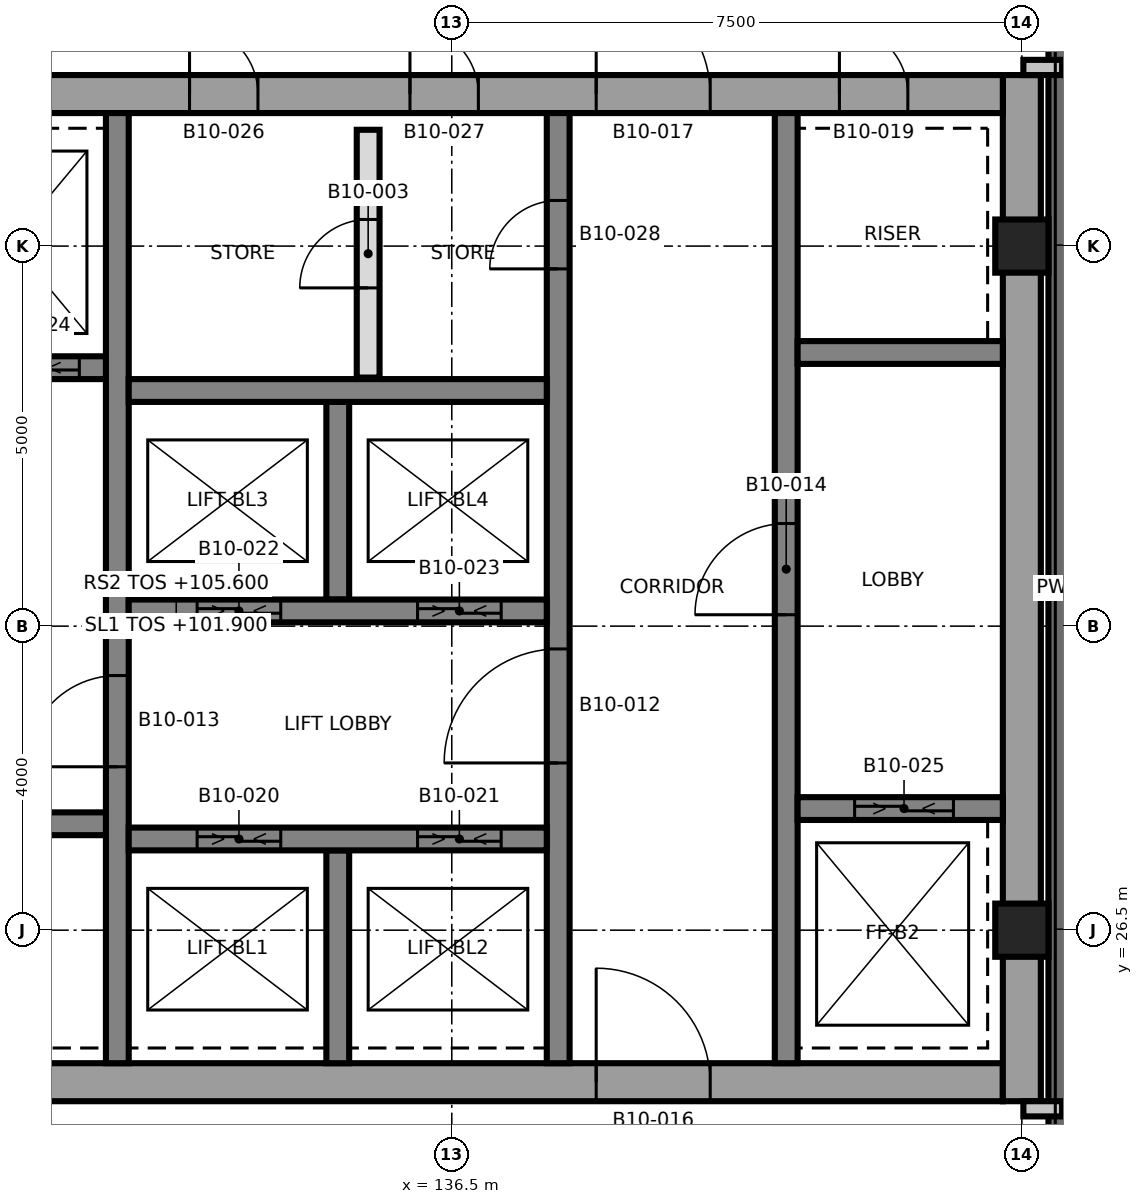
"""IFC4 building model, lengths in metres.
Left out: names, types, materials, properties, quantities, classifications, styles, units other than length and angle.
Written with IfcOpenShell. Run it as: python <this file> out.ifc"""

import sys

from ifc_helpers import new_model, si_unit, direction, frame, frame_2d, origin, origin_2d, place, context, subcontext, project, spatial, rectangle, extrude, element, fill, save


model = new_model("IFC4")
c1 = context("Model", 3, precision=1e-05, world=origin(), true_north=direction((0.0, 1.0)))
c2 = subcontext(c1, "Body", "Model", "MODEL_VIEW")
j1 = project(units=[si_unit("LENGTHUNIT", "METRE"), si_unit("PLANEANGLEUNIT", "RADIAN")], contexts=[c1])
p1 = place(None, origin())
s1 = spatial("IfcSite", under=j1, at=p1, CompositionType="ELEMENT")
p2 = place(p1, origin())
s2 = spatial("IfcBuilding", under=s1, at=p2, CompositionType="ELEMENT")
p3 = place(p2, frame((0.0, 0.0, 101.9)))
s3 = spatial("IfcBuildingStorey", under=s2, at=p3, CompositionType="ELEMENT", Elevation=101.9)
p4 = place(p3, frame((128.75, 24.5, 0.0), z_axis=(0.0, 0.0, 1.0), x_axis=(1.0, 0.0, 0.0)))
e1 = element("IfcWall", 1, at=p4, inside=s3, PredefinedType="SHEAR", context=c2, shape_type="SweptSolid", body=[
    extrude(rectangle(XDim=15.0, YDim=0.5, at=frame_2d((7.5, 0.0))), origin(), (0.0, 0.0, 1.0), 3.7),
])
p5 = place(p4, frame((9.65, 0.0, 0.0)))
e2 = element("IfcOpeningElement", 2, at=p5, cuts=e1, PredefinedType="OPENING", context=c2, shape_type="SweptSolid", body=[
    extrude(rectangle(XDim=1.5, YDim=2.1, at=frame_2d((0.75, 1.05))), frame((0.0, 0.26, 0.0), z_axis=(0.0, -1.0, 0.0), x_axis=(1.0, 0.0, 0.0)), (0.0, 0.0, 1.0), 0.52),
])
p6 = place(p4, frame((1.25, 0.0, 0.0)))
e3 = element("IfcOpeningElement", 3, at=p6, cuts=e1, PredefinedType="OPENING", context=c2, shape_type="SweptSolid", body=[
    extrude(rectangle(XDim=0.9, YDim=2.1, at=frame_2d((0.45, 1.05))), frame((0.0, 0.26, 0.0), z_axis=(0.0, -1.0, 0.0), x_axis=(1.0, 0.0, 0.0)), (0.0, 0.0, 1.0), 0.52),
])
p7 = place(p3, frame((144.0, 24.25, 0.0), z_axis=(0.0, 0.0, 1.0), x_axis=(0.0, 1.0, 0.0)))
e4 = element("IfcWall", 4, at=p7, inside=s3, PredefinedType="SHEAR", context=c2, shape_type="SweptSolid", body=[
    extrude(rectangle(XDim=13.5, YDim=0.5, at=frame_2d((6.75, 0.0))), origin(), (0.0, 0.0, 1.0), 3.7),
])
p8 = place(p3, frame((128.75, 37.5, 0.0), z_axis=(0.0, 0.0, 1.0), x_axis=(1.0, 0.0, 0.0)))
e5 = element("IfcWall", 5, at=p8, inside=s3, PredefinedType="SHEAR", context=c2, shape_type="SweptSolid", body=[
    extrude(rectangle(XDim=15.0, YDim=0.5, at=frame_2d((7.5, 0.0))), origin(), (0.0, 0.0, 1.0), 3.7),
])
p9 = place(p8, frame((9.65, 0.0, 0.0)))
e6 = element("IfcOpeningElement", 6, at=p9, cuts=e5, PredefinedType="OPENING", context=c2, shape_type="SweptSolid", body=[
    extrude(rectangle(XDim=1.5, YDim=2.1, at=frame_2d((0.75, 1.05))), frame((0.0, 0.26, 0.0), z_axis=(0.0, -1.0, 0.0), x_axis=(1.0, 0.0, 0.0)), (0.0, 0.0, 1.0), 0.52),
])
p10 = place(p8, frame((12.85, 0.0, 0.0)))
e7 = element("IfcOpeningElement", 7, at=p10, cuts=e5, PredefinedType="OPENING", context=c2, shape_type="SweptSolid", body=[
    extrude(rectangle(XDim=0.9, YDim=2.1, at=frame_2d((0.45, 1.05))), frame((0.0, 0.26, 0.0), z_axis=(0.0, -1.0, 0.0), x_axis=(1.0, 0.0, 0.0)), (0.0, 0.0, 1.0), 0.52),
])
p11 = place(p8, frame((4.3, 0.0, 0.0)))
e8 = element("IfcOpeningElement", 8, at=p11, cuts=e5, PredefinedType="OPENING", context=c2, shape_type="SweptSolid", body=[
    extrude(rectangle(XDim=0.9, YDim=2.1, at=frame_2d((0.45, 1.05))), frame((0.0, 0.26, 0.0), z_axis=(0.0, -1.0, 0.0), x_axis=(1.0, 0.0, 0.0)), (0.0, 0.0, 1.0), 0.52),
])
p12 = place(p8, frame((7.2, 0.0, 0.0)))
e9 = element("IfcOpeningElement", 9, at=p12, cuts=e5, PredefinedType="OPENING", context=c2, shape_type="SweptSolid", body=[
    extrude(rectangle(XDim=0.9, YDim=2.1, at=frame_2d((0.45, 1.05))), frame((0.0, 0.26, 0.0), z_axis=(0.0, -1.0, 0.0), x_axis=(1.0, 0.0, 0.0)), (0.0, 0.0, 1.0), 0.52),
])
p13 = place(p3, frame((132.1, 24.75, 0.0), z_axis=(0.0, 0.0, 1.0), x_axis=(0.0, 1.0, 0.0)))
e10 = element("IfcWall", 10, at=p13, inside=s3, PredefinedType="SHEAR", context=c2, shape_type="SweptSolid", body=[
    extrude(rectangle(XDim=12.5, YDim=0.3, at=frame_2d((6.25, 0.0))), origin(), (0.0, 0.0, 1.0), 3.7),
])
p14 = place(p13, frame((3.9, 0.0, 0.0)))
e11 = element("IfcOpeningElement", 11, at=p14, cuts=e10, PredefinedType="OPENING", context=c2, shape_type="SweptSolid", body=[
    extrude(rectangle(XDim=1.2, YDim=2.1, at=frame_2d((0.6, 1.05))), frame((0.0, 0.16, 0.0), z_axis=(0.0, -1.0, 0.0), x_axis=(1.0, 0.0, 0.0)), (0.0, 0.0, 1.0), 0.32),
])
p15 = place(p3, frame((137.9, 24.75, 0.0), z_axis=(0.0, 0.0, 1.0), x_axis=(0.0, 1.0, 0.0)))
e12 = element("IfcWall", 12, at=p15, inside=s3, PredefinedType="SHEAR", context=c2, shape_type="SweptSolid", body=[
    extrude(rectangle(XDim=12.5, YDim=0.3, at=frame_2d((6.25, 0.0))), origin(), (0.0, 0.0, 1.0), 3.7),
])
p16 = place(p15, frame((3.95, 0.0, 0.0)))
e13 = element("IfcOpeningElement", 13, at=p16, cuts=e12, PredefinedType="OPENING", context=c2, shape_type="SweptSolid", body=[
    extrude(rectangle(XDim=1.5, YDim=2.1, at=frame_2d((0.75, 1.05))), frame((0.0, 0.16, 0.0), z_axis=(0.0, -1.0, 0.0), x_axis=(1.0, 0.0, 0.0)), (0.0, 0.0, 1.0), 0.32),
])
p17 = place(p15, frame((10.45, 0.0, 0.0)))
e14 = element("IfcOpeningElement", 14, at=p17, cuts=e12, PredefinedType="OPENING", context=c2, shape_type="SweptSolid", body=[
    extrude(rectangle(XDim=0.9, YDim=2.1, at=frame_2d((0.45, 1.05))), frame((0.0, 0.16, 0.0), z_axis=(0.0, -1.0, 0.0), x_axis=(1.0, 0.0, 0.0)), (0.0, 0.0, 1.0), 0.32),
])
p18 = place(p3, frame((140.9, 24.75, 0.0), z_axis=(0.0, 0.0, 1.0), x_axis=(0.0, 1.0, 0.0)))
e15 = element("IfcWall", 15, at=p18, inside=s3, PredefinedType="SHEAR", context=c2, shape_type="SweptSolid", body=[
    extrude(rectangle(XDim=12.5, YDim=0.3, at=frame_2d((6.25, 0.0))), origin(), (0.0, 0.0, 1.0), 3.7),
])
p19 = place(p18, frame((5.9, 0.0, 0.0)))
e16 = element("IfcOpeningElement", 16, at=p19, cuts=e15, PredefinedType="OPENING", context=c2, shape_type="SweptSolid", body=[
    extrude(rectangle(XDim=1.2, YDim=2.1, at=frame_2d((0.6, 1.05))), frame((0.0, 0.16, 0.0), z_axis=(0.0, -1.0, 0.0), x_axis=(1.0, 0.0, 0.0)), (0.0, 0.0, 1.0), 0.32),
])
p20 = place(p3, frame((135.0, 24.75, 0.0), z_axis=(0.0, 0.0, 1.0), x_axis=(0.0, 1.0, 0.0)))
e17 = element("IfcWall", 17, at=p20, inside=s3, PredefinedType="SHEAR", context=c2, shape_type="SweptSolid", body=[
    extrude(rectangle(XDim=2.8, YDim=0.3, at=frame_2d((1.4, 0.0))), origin(), (0.0, 0.0, 1.0), 3.7),
])
p21 = place(p3, frame((135.0, 30.85, 0.0), z_axis=(0.0, 0.0, 1.0), x_axis=(0.0, 1.0, 0.0)))
e18 = element("IfcWall", 18, at=p21, inside=s3, PredefinedType="SHEAR", context=c2, shape_type="SweptSolid", body=[
    extrude(rectangle(XDim=2.6, YDim=0.3, at=frame_2d((1.3, 0.0))), origin(), (0.0, 0.0, 1.0), 3.7),
])
p22 = place(p3, frame((132.25, 27.7, 0.0), z_axis=(0.0, 0.0, 1.0), x_axis=(1.0, 0.0, 0.0)))
e19 = element("IfcWall", 19, at=p22, inside=s3, PredefinedType="SHEAR", context=c2, shape_type="SweptSolid", body=[
    extrude(rectangle(XDim=5.5, YDim=0.3, at=frame_2d((2.75, 0.0))), origin(), (0.0, 0.0, 1.0), 3.7),
])
p23 = place(p22, frame((0.9, 0.0, 0.0)))
e20 = element("IfcOpeningElement", 20, at=p23, cuts=e19, PredefinedType="OPENING", context=c2, shape_type="SweptSolid", body=[
    extrude(rectangle(XDim=1.1, YDim=2.4, at=frame_2d((0.55, 1.2))), frame((0.0, 0.16, 0.0), z_axis=(0.0, -1.0, 0.0), x_axis=(1.0, 0.0, 0.0)), (0.0, 0.0, 1.0), 0.32),
])
p24 = place(p22, frame((3.8, 0.0, 0.0)))
e21 = element("IfcOpeningElement", 21, at=p24, cuts=e19, PredefinedType="OPENING", context=c2, shape_type="SweptSolid", body=[
    extrude(rectangle(XDim=1.1, YDim=2.4, at=frame_2d((0.55, 1.2))), frame((0.0, 0.16, 0.0), z_axis=(0.0, -1.0, 0.0), x_axis=(1.0, 0.0, 0.0)), (0.0, 0.0, 1.0), 0.32),
])
p25 = place(p3, frame((132.25, 30.7, 0.0), z_axis=(0.0, 0.0, 1.0), x_axis=(1.0, 0.0, 0.0)))
e22 = element("IfcWall", 22, at=p25, inside=s3, PredefinedType="SHEAR", context=c2, shape_type="SweptSolid", body=[
    extrude(rectangle(XDim=5.5, YDim=0.3, at=frame_2d((2.75, 0.0))), origin(), (0.0, 0.0, 1.0), 3.7),
])
p26 = place(p25, frame((0.9, 0.0, 0.0)))
e23 = element("IfcOpeningElement", 23, at=p26, cuts=e22, PredefinedType="OPENING", context=c2, shape_type="SweptSolid", body=[
    extrude(rectangle(XDim=1.1, YDim=2.4, at=frame_2d((0.55, 1.2))), frame((0.0, 0.16, 0.0), z_axis=(0.0, -1.0, 0.0), x_axis=(1.0, 0.0, 0.0)), (0.0, 0.0, 1.0), 0.32),
])
p27 = place(p25, frame((3.8, 0.0, 0.0)))
e24 = element("IfcOpeningElement", 24, at=p27, cuts=e22, PredefinedType="OPENING", context=c2, shape_type="SweptSolid", body=[
    extrude(rectangle(XDim=1.1, YDim=2.4, at=frame_2d((0.55, 1.2))), frame((0.0, 0.16, 0.0), z_axis=(0.0, -1.0, 0.0), x_axis=(1.0, 0.0, 0.0)), (0.0, 0.0, 1.0), 0.32),
])
p28 = place(p3, frame((132.25, 33.6, 0.0), z_axis=(0.0, 0.0, 1.0), x_axis=(1.0, 0.0, 0.0)))
e25 = element("IfcWall", 25, at=p28, inside=s3, PredefinedType="SHEAR", context=c2, shape_type="SweptSolid", body=[
    extrude(rectangle(XDim=5.5, YDim=0.3, at=frame_2d((2.75, 0.0))), origin(), (0.0, 0.0, 1.0), 3.7),
])
p29 = place(p3, frame((129.25, 27.9, 0.0), z_axis=(0.0, 0.0, 1.0), x_axis=(1.0, 0.0, 0.0)))
e26 = element("IfcWall", 26, at=p29, inside=s3, PredefinedType="SHEAR", context=c2, shape_type="SweptSolid", body=[
    extrude(rectangle(XDim=2.7, YDim=0.3, at=frame_2d((1.35, 0.0))), origin(), (0.0, 0.0, 1.0), 3.7),
])
p30 = place(p3, frame((129.25, 33.9, 0.0), z_axis=(0.0, 0.0, 1.0), x_axis=(1.0, 0.0, 0.0)))
e27 = element("IfcWall", 27, at=p30, inside=s3, PredefinedType="SHEAR", context=c2, shape_type="SweptSolid", body=[
    extrude(rectangle(XDim=2.7, YDim=0.3, at=frame_2d((1.35, 0.0))), origin(), (0.0, 0.0, 1.0), 3.7),
])
p31 = place(p30, frame((1.05, 0.0, 0.0)))
e28 = element("IfcOpeningElement", 28, at=p31, cuts=e27, PredefinedType="OPENING", context=c2, shape_type="SweptSolid", body=[
    extrude(rectangle(XDim=1.3, YDim=2.4, at=frame_2d((0.65, 1.2))), frame((0.0, 0.16, 0.0), z_axis=(0.0, -1.0, 0.0), x_axis=(1.0, 0.0, 0.0)), (0.0, 0.0, 1.0), 0.32),
])
p32 = place(p3, frame((141.05, 28.1, 0.0), z_axis=(0.0, 0.0, 1.0), x_axis=(1.0, 0.0, 0.0)))
e29 = element("IfcWall", 29, at=p32, inside=s3, PredefinedType="SHEAR", context=c2, shape_type="SweptSolid", body=[
    extrude(rectangle(XDim=2.7, YDim=0.3, at=frame_2d((1.35, 0.0))), origin(), (0.0, 0.0, 1.0), 3.7),
])
p33 = place(p32, frame((0.75, 0.0, 0.0)))
e30 = element("IfcOpeningElement", 30, at=p33, cuts=e29, PredefinedType="OPENING", context=c2, shape_type="SweptSolid", body=[
    extrude(rectangle(XDim=1.3, YDim=2.4, at=frame_2d((0.65, 1.2))), frame((0.0, 0.16, 0.0), z_axis=(0.0, -1.0, 0.0), x_axis=(1.0, 0.0, 0.0)), (0.0, 0.0, 1.0), 0.32),
])
p34 = place(p3, frame((141.05, 34.1, 0.0), z_axis=(0.0, 0.0, 1.0), x_axis=(1.0, 0.0, 0.0)))
e31 = element("IfcWall", 31, at=p34, inside=s3, PredefinedType="SHEAR", context=c2, shape_type="SweptSolid", body=[
    extrude(rectangle(XDim=2.7, YDim=0.3, at=frame_2d((1.35, 0.0))), origin(), (0.0, 0.0, 1.0), 3.7),
])
for number, where, z_axis, x_axis in (
    (32, (144.0, 26.5, 0.0), (0.0, 0.0, 1.0), (1.0, 0.0, 0.0)),
    (33, (144.0, 35.5, 0.0), (0.0, 0.0, 1.0), (1.0, 0.0, 0.0)),
):
    element("IfcColumn", number, at=place(p3, frame(where, z_axis=z_axis, x_axis=x_axis)), inside=s3, PredefinedType="COLUMN", context=c2, shape_type="SweptSolid", body=[
        extrude(rectangle(XDim=0.7, YDim=0.7, at=origin_2d()), origin(), (0.0, 0.0, 1.0), 3.7),
    ])
p35 = place(p3, frame((144.475, 22.02, 3.7), z_axis=(0.0, 0.0, 1.0), x_axis=(0.0, 1.0, 0.0)))
e34 = element("IfcWall", 34, at=p35, inside=s3, PredefinedType="PARAPET", context=c2, shape_type="SweptSolid", body=[
    extrude(rectangle(XDim=17.96, YDim=0.25, at=frame_2d((8.98, 0.0))), origin(), (0.0, 0.0, 1.0), 1.1),
])
for number, where, z_axis, x_axis in (
    (35, (144.02, 24.15, 0.0), (0.0, 0.0, 1.0), (1.0, 0.0, 0.0)),
    (36, (144.02, 37.85, 0.0), (0.0, 0.0, 1.0), (1.0, 0.0, 0.0)),
):
    element("IfcWall", number, at=place(p3, frame(where, z_axis=z_axis, x_axis=x_axis)), inside=s3, PredefinedType="PARTITIONING", context=c2, shape_type="SweptSolid", body=[
        extrude(rectangle(XDim=0.51, YDim=0.2, at=frame_2d((0.255, 0.0))), origin(), (0.0, 0.0, 1.0), 3.3),
    ])
p36 = place(p3, frame((135.4, 33.77, 0.0), z_axis=(0.0, 0.0, 1.0), x_axis=(0.0, 1.0, 0.0)))
e37 = element("IfcWall", 37, at=p36, inside=s3, PredefinedType="PARTITIONING", context=c2, shape_type="SweptSolid", body=[
    extrude(rectangle(XDim=3.26, YDim=0.3, at=frame_2d((1.63, 0.0))), origin(), (0.0, 0.0, 1.0), 3.3),
])
p37 = place(p36, frame((1.18, 0.0, 0.0)))
e38 = element("IfcOpeningElement", 38, at=p37, cuts=e37, PredefinedType="OPENING", context=c2, shape_type="SweptSolid", body=[
    extrude(rectangle(XDim=0.9, YDim=2.1, at=frame_2d((0.45, 1.05))), frame((0.0, 0.16, 0.0), z_axis=(0.0, -1.0, 0.0), x_axis=(1.0, 0.0, 0.0)), (0.0, 0.0, 1.0), 0.32),
])
p38 = place(p37, origin())
e39 = element("IfcDoor", 39, at=p38, inside=s3, OperationType="SINGLE_SWING_LEFT", PredefinedType="DOOR", context=c2, shape_type="SweptSolid", body=[
    extrude(rectangle(XDim=0.9, YDim=2.1, at=frame_2d((0.45, 1.05))), frame((0.0, 0.025, 0.0), z_axis=(0.0, -1.0, 0.0), x_axis=(1.0, 0.0, 0.0)), (0.0, 0.0, 1.0), 0.05),
])
fill(e38, e39)
p39 = place(p16, origin())
e40 = element("IfcDoor", 40, at=p39, inside=s3, OperationType="SINGLE_SWING_RIGHT", PredefinedType="DOOR", context=c2, shape_type="SweptSolid", body=[
    extrude(rectangle(XDim=1.5, YDim=2.1, at=frame_2d((0.75, 1.05))), frame((0.0, 0.025, 0.0), z_axis=(0.0, -1.0, 0.0), x_axis=(1.0, 0.0, 0.0)), (0.0, 0.0, 1.0), 0.05),
])
fill(e13, e40)
p40 = place(p14, origin())
e41 = element("IfcDoor", 41, at=p40, inside=s3, OperationType="SINGLE_SWING_LEFT", PredefinedType="DOOR", context=c2, shape_type="SweptSolid", body=[
    extrude(rectangle(XDim=1.2, YDim=2.1, at=frame_2d((0.6, 1.05))), frame((0.0, 0.025, 0.0), z_axis=(0.0, -1.0, 0.0), x_axis=(1.0, 0.0, 0.0)), (0.0, 0.0, 1.0), 0.05),
])
fill(e11, e41)
p41 = place(p19, origin())
e42 = element("IfcDoor", 42, at=p41, inside=s3, OperationType="SINGLE_SWING_RIGHT", PredefinedType="DOOR", context=c2, shape_type="SweptSolid", body=[
    extrude(rectangle(XDim=1.2, YDim=2.1, at=frame_2d((0.6, 1.05))), frame((0.0, 0.025, 0.0), z_axis=(0.0, -1.0, 0.0), x_axis=(1.0, 0.0, 0.0)), (0.0, 0.0, 1.0), 0.05),
])
fill(e16, e42)
p42 = place(p5, origin())
e43 = element("IfcDoor", 43, at=p42, inside=s3, OperationType="SINGLE_SWING_LEFT", PredefinedType="DOOR", context=c2, shape_type="SweptSolid", body=[
    extrude(rectangle(XDim=1.5, YDim=2.1, at=frame_2d((0.75, 1.05))), frame((0.0, 0.025, 0.0), z_axis=(0.0, -1.0, 0.0), x_axis=(1.0, 0.0, 0.0)), (0.0, 0.0, 1.0), 0.05),
])
fill(e2, e43)
p43 = place(p9, origin())
e44 = element("IfcDoor", 44, at=p43, inside=s3, OperationType="SINGLE_SWING_RIGHT", PredefinedType="DOOR", context=c2, shape_type="SweptSolid", body=[
    extrude(rectangle(XDim=1.5, YDim=2.1, at=frame_2d((0.75, 1.05))), frame((0.0, 0.025, 0.0), z_axis=(0.0, -1.0, 0.0), x_axis=(1.0, 0.0, 0.0)), (0.0, 0.0, 1.0), 0.05),
])
fill(e6, e44)
p44 = place(p10, origin())
e45 = element("IfcDoor", 45, at=p44, inside=s3, OperationType="SINGLE_SWING_RIGHT", PredefinedType="DOOR", context=c2, shape_type="SweptSolid", body=[
    extrude(rectangle(XDim=0.9, YDim=2.1, at=frame_2d((0.45, 1.05))), frame((0.0, 0.025, 0.0), z_axis=(0.0, -1.0, 0.0), x_axis=(1.0, 0.0, 0.0)), (0.0, 0.0, 1.0), 0.05),
])
fill(e7, e45)
p45 = place(p23, origin())
e46 = element("IfcDoor", 46, at=p45, inside=s3, OperationType="SLIDING_TO_LEFT", PredefinedType="DOOR", context=c2, shape_type="SweptSolid", body=[
    extrude(rectangle(XDim=1.1, YDim=2.4, at=frame_2d((0.55, 1.2))), frame((0.0, 0.025, 0.0), z_axis=(0.0, -1.0, 0.0), x_axis=(1.0, 0.0, 0.0)), (0.0, 0.0, 1.0), 0.05),
])
fill(e20, e46)
p46 = place(p24, origin())
e47 = element("IfcDoor", 47, at=p46, inside=s3, OperationType="SLIDING_TO_LEFT", PredefinedType="DOOR", context=c2, shape_type="SweptSolid", body=[
    extrude(rectangle(XDim=1.1, YDim=2.4, at=frame_2d((0.55, 1.2))), frame((0.0, 0.025, 0.0), z_axis=(0.0, -1.0, 0.0), x_axis=(1.0, 0.0, 0.0)), (0.0, 0.0, 1.0), 0.05),
])
fill(e21, e47)
p47 = place(p26, origin())
e48 = element("IfcDoor", 48, at=p47, inside=s3, OperationType="SLIDING_TO_LEFT", PredefinedType="DOOR", context=c2, shape_type="SweptSolid", body=[
    extrude(rectangle(XDim=1.1, YDim=2.4, at=frame_2d((0.55, 1.2))), frame((0.0, 0.025, 0.0), z_axis=(0.0, -1.0, 0.0), x_axis=(1.0, 0.0, 0.0)), (0.0, 0.0, 1.0), 0.05),
])
fill(e23, e48)
p48 = place(p27, origin())
e49 = element("IfcDoor", 49, at=p48, inside=s3, OperationType="SLIDING_TO_LEFT", PredefinedType="DOOR", context=c2, shape_type="SweptSolid", body=[
    extrude(rectangle(XDim=1.1, YDim=2.4, at=frame_2d((0.55, 1.2))), frame((0.0, 0.025, 0.0), z_axis=(0.0, -1.0, 0.0), x_axis=(1.0, 0.0, 0.0)), (0.0, 0.0, 1.0), 0.05),
])
fill(e24, e49)
p49 = place(p31, origin())
e50 = element("IfcDoor", 50, at=p49, inside=s3, OperationType="SLIDING_TO_LEFT", PredefinedType="DOOR", context=c2, shape_type="SweptSolid", body=[
    extrude(rectangle(XDim=1.3, YDim=2.4, at=frame_2d((0.65, 1.2))), frame((0.0, 0.025, 0.0), z_axis=(0.0, -1.0, 0.0), x_axis=(1.0, 0.0, 0.0)), (0.0, 0.0, 1.0), 0.05),
])
fill(e28, e50)
p50 = place(p33, origin())
e51 = element("IfcDoor", 51, at=p50, inside=s3, OperationType="SLIDING_TO_LEFT", PredefinedType="DOOR", context=c2, shape_type="SweptSolid", body=[
    extrude(rectangle(XDim=1.3, YDim=2.4, at=frame_2d((0.65, 1.2))), frame((0.0, 0.025, 0.0), z_axis=(0.0, -1.0, 0.0), x_axis=(1.0, 0.0, 0.0)), (0.0, 0.0, 1.0), 0.05),
])
fill(e30, e51)
p51 = place(p11, origin())
e52 = element("IfcDoor", 52, at=p51, inside=s3, OperationType="SINGLE_SWING_LEFT", PredefinedType="DOOR", context=c2, shape_type="SweptSolid", body=[
    extrude(rectangle(XDim=0.9, YDim=2.1, at=frame_2d((0.45, 1.05))), frame((0.0, 0.025, 0.0), z_axis=(0.0, -1.0, 0.0), x_axis=(1.0, 0.0, 0.0)), (0.0, 0.0, 1.0), 0.05),
])
fill(e8, e52)
p52 = place(p12, origin())
e53 = element("IfcDoor", 53, at=p52, inside=s3, OperationType="SINGLE_SWING_RIGHT", PredefinedType="DOOR", context=c2, shape_type="SweptSolid", body=[
    extrude(rectangle(XDim=0.9, YDim=2.1, at=frame_2d((0.45, 1.05))), frame((0.0, 0.025, 0.0), z_axis=(0.0, -1.0, 0.0), x_axis=(1.0, 0.0, 0.0)), (0.0, 0.0, 1.0), 0.05),
])
fill(e9, e53)
p53 = place(p17, origin())
e54 = element("IfcDoor", 54, at=p53, inside=s3, OperationType="SINGLE_SWING_RIGHT", PredefinedType="DOOR", context=c2, shape_type="SweptSolid", body=[
    extrude(rectangle(XDim=0.9, YDim=2.1, at=frame_2d((0.45, 1.05))), frame((0.0, 0.025, 0.0), z_axis=(0.0, -1.0, 0.0), x_axis=(1.0, 0.0, 0.0)), (0.0, 0.0, 1.0), 0.05),
])
fill(e14, e54)
save(model, sys.argv[1])
